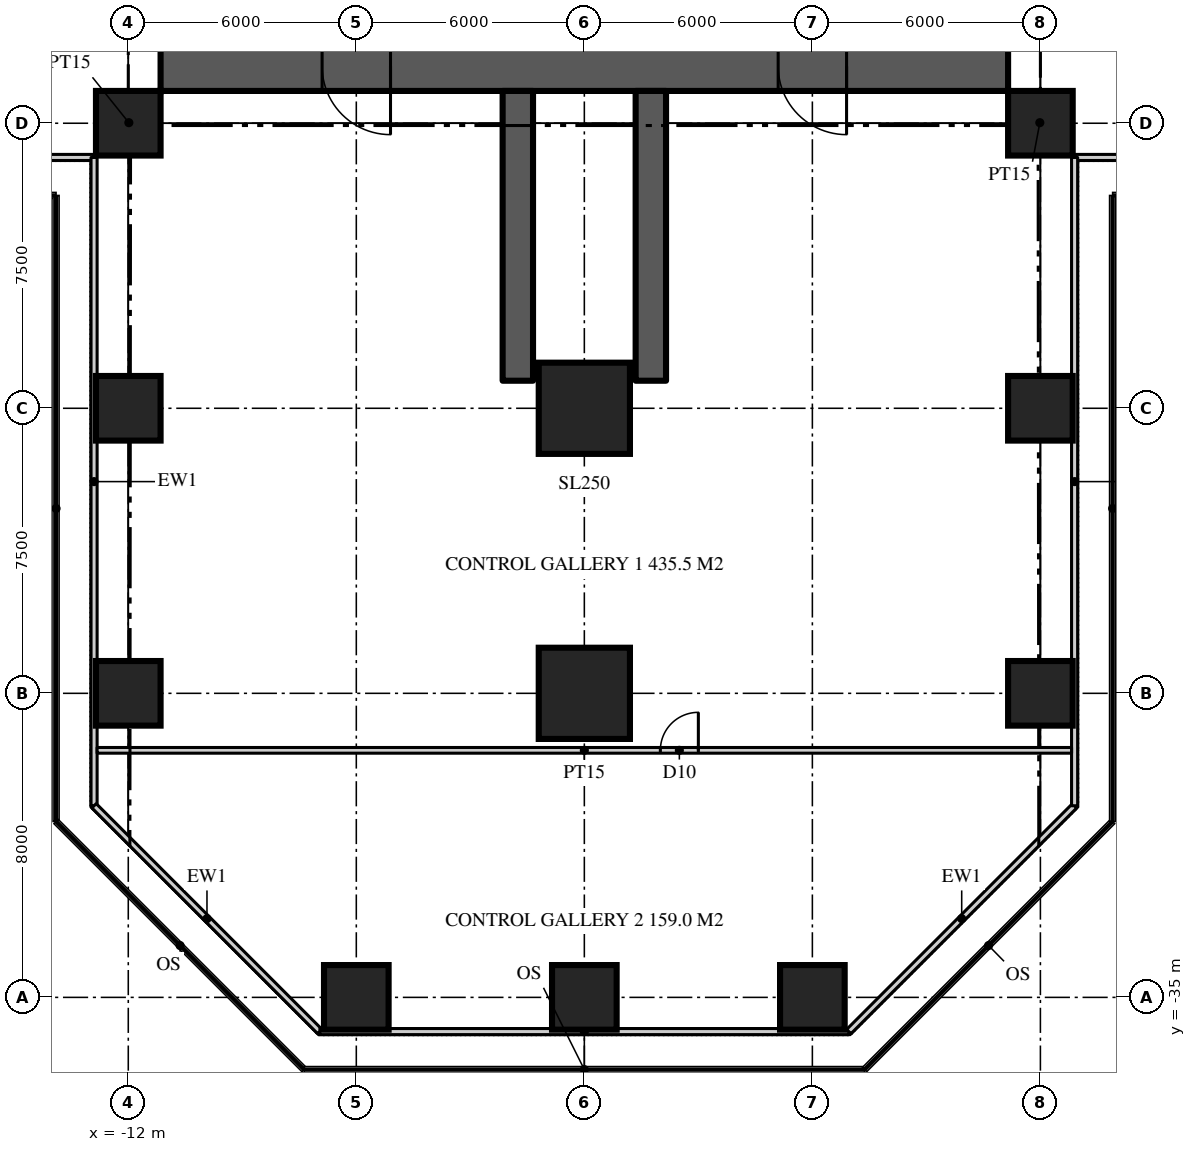
"""IFC4 building model, lengths in metres.
Left out: names, types, materials, properties, quantities, classifications, styles, units other than length and angle.
Written with IfcOpenShell. Run it as: python <this file> out.ifc"""

import sys

from ifc_helpers import new_model, si_unit, direction, frame, frame_2d, origin, origin_2d, place, context, subcontext, project, spatial, rectangle, extrude, element, fill, save


model = new_model("IFC4")
c1 = context("Model", 3, precision=1e-05, world=origin(), true_north=direction((0.0, 1.0)))
c2 = subcontext(c1, "Body", "Model", "MODEL_VIEW")
j1 = project(units=[si_unit("LENGTHUNIT", "METRE"), si_unit("PLANEANGLEUNIT", "RADIAN")], contexts=[c1])
p1 = place(None, origin())
s1 = spatial("IfcSite", under=j1, at=p1, CompositionType="ELEMENT")
p2 = place(p1, origin())
s2 = spatial("IfcBuilding", under=s1, at=p2, CompositionType="ELEMENT")
p3 = place(p2, frame((0.0, 0.0, 15.0)))
s3 = spatial("IfcBuildingStorey", under=s2, at=p3, CompositionType="ELEMENT", Elevation=15.0)
p4 = place(p3, frame((11.15, -10.5, 0.0), z_axis=(0.0, 0.0, 1.0), x_axis=(-1.0, 0.0, 0.0)))
e1 = element("IfcWall", 1, at=p4, inside=s3, PredefinedType="SHEAR", context=c2, shape_type="SweptSolid", body=[
    extrude(rectangle(XDim=22.3, YDim=1.3, at=frame_2d((11.15, 0.0))), origin(), (0.0, 0.0, 1.0), 8.0),
])
p5 = place(p4, frame((16.25, 0.0, 0.0)))
e2 = element("IfcOpeningElement", 2, at=p5, cuts=e1, PredefinedType="OPENING", context=c2, shape_type="SweptSolid", body=[
    extrude(rectangle(XDim=1.8, YDim=2.2, at=frame_2d((0.9, 1.1))), frame((0.0, 0.66, 0.0), z_axis=(0.0, -1.0, 0.0), x_axis=(1.0, 0.0, 0.0)), (0.0, 0.0, 1.0), 1.32),
])
p6 = place(p4, frame((4.25, 0.0, 0.0)))
e3 = element("IfcOpeningElement", 3, at=p6, cuts=e1, PredefinedType="OPENING", context=c2, shape_type="SweptSolid", body=[
    extrude(rectangle(XDim=1.8, YDim=2.2, at=frame_2d((0.9, 1.1))), frame((0.0, 0.66, 0.0), z_axis=(0.0, -1.0, 0.0), x_axis=(1.0, 0.0, 0.0)), (0.0, 0.0, 1.0), 1.32),
])
for number, where, z_axis, x_axis in (
    (4, (-1.75, -11.15, 0.0), (0.0, 0.0, 1.0), (0.0, -1.0, 0.0)),
    (5, (1.75, -11.15, 0.0), (0.0, 0.0, 1.0), (0.0, -1.0, 0.0)),
):
    element("IfcWall", number, at=place(p3, frame(where, z_axis=z_axis, x_axis=x_axis)), inside=s3, PredefinedType="SHEAR", context=c2, shape_type="SweptSolid", body=[
        extrude(rectangle(XDim=7.625, YDim=0.8, at=frame_2d((3.812, 0.0))), origin(), (0.0, 0.0, 1.0), 8.0),
    ])
for number, where, z_axis, x_axis in (
    (6, (-6.0, -35.0, 0.0), (0.0, 0.0, 1.0), (1.0, 0.0, 0.0)),
    (7, (0.0, -35.0, 0.0), (0.0, 0.0, 1.0), (1.0, 0.0, 0.0)),
    (8, (6.0, -35.0, 0.0), (0.0, 0.0, 1.0), (1.0, 0.0, 0.0)),
    (9, (-12.0, -27.0, 0.0), (0.0, 0.0, 1.0), (1.0, 0.0, 0.0)),
):
    element("IfcColumn", number, at=place(p3, frame(where, z_axis=z_axis, x_axis=x_axis)), inside=s3, PredefinedType="COLUMN", context=c2, shape_type="SweptSolid", body=[
        extrude(rectangle(XDim=1.7, YDim=1.7, at=origin_2d()), origin(), (0.0, 0.0, 1.0), 8.0),
    ])
p7 = place(p3, frame((0.0, -27.0, 0.0), z_axis=(0.0, 0.0, 1.0), x_axis=(1.0, 0.0, 0.0)))
e10 = element("IfcColumn", 10, at=p7, inside=s3, PredefinedType="COLUMN", context=c2, shape_type="SweptSolid", body=[
    extrude(rectangle(XDim=2.4, YDim=2.4, at=origin_2d()), origin(), (0.0, 0.0, 1.0), 8.0),
])
for number, where, z_axis, x_axis in (
    (11, (12.0, -27.0, 0.0), (0.0, 0.0, 1.0), (1.0, 0.0, 0.0)),
    (12, (-12.0, -19.5, 0.0), (0.0, 0.0, 1.0), (1.0, 0.0, 0.0)),
):
    element("IfcColumn", number, at=place(p3, frame(where, z_axis=z_axis, x_axis=x_axis)), inside=s3, PredefinedType="COLUMN", context=c2, shape_type="SweptSolid", body=[
        extrude(rectangle(XDim=1.7, YDim=1.7, at=origin_2d()), origin(), (0.0, 0.0, 1.0), 8.0),
    ])
p8 = place(p3, frame((0.0, -19.5, 0.0), z_axis=(0.0, 0.0, 1.0), x_axis=(1.0, 0.0, 0.0)))
e13 = element("IfcColumn", 13, at=p8, inside=s3, PredefinedType="COLUMN", context=c2, shape_type="SweptSolid", body=[
    extrude(rectangle(XDim=2.4, YDim=2.4, at=origin_2d()), origin(), (0.0, 0.0, 1.0), 8.0),
])
for number, where, z_axis, x_axis in (
    (14, (12.0, -19.5, 0.0), (0.0, 0.0, 1.0), (1.0, 0.0, 0.0)),
    (15, (-12.0, -12.0, 0.0), (0.0, 0.0, 1.0), (1.0, 0.0, 0.0)),
    (16, (12.0, -12.0, 0.0), (0.0, 0.0, 1.0), (1.0, 0.0, 0.0)),
):
    element("IfcColumn", number, at=place(p3, frame(where, z_axis=z_axis, x_axis=x_axis)), inside=s3, PredefinedType="COLUMN", context=c2, shape_type="SweptSolid", body=[
        extrude(rectangle(XDim=1.7, YDim=1.7, at=origin_2d()), origin(), (0.0, 0.0, 1.0), 8.0),
    ])
for number, where, z_axis, x_axis in (
    (17, (12.9, -12.9, 0.0), (0.0, 0.0, 1.0), (1.0, 0.0, 0.0)),
    (18, (-29.958, -12.9, 0.0), (0.0, 0.0, 1.0), (1.0, 0.0, 0.0)),
    (19, (-12.9, -12.9, 0.0), (0.0, 0.0, 1.0), (0.0, -1.0, 0.0)),
):
    element("IfcWall", number, at=place(p3, frame(where, z_axis=z_axis, x_axis=x_axis)), inside=s3, PredefinedType="SOLIDWALL", context=c2, shape_type="SweptSolid", body=[
        extrude(rectangle(XDim=17.059, YDim=0.16, at=frame_2d((8.529, 0.0))), origin(), (0.0, 0.0, 1.0), 7.75),
    ])
p9 = place(p3, frame((-12.9, -29.958, 0.0), z_axis=(0.0, 0.0, 1.0), x_axis=(0.707106781187, -0.707106781187, 0.0)))
e20 = element("IfcWall", 20, at=p9, inside=s3, PredefinedType="SOLIDWALL", context=c2, shape_type="SweptSolid", body=[
    extrude(rectangle(XDim=8.402, YDim=0.16, at=frame_2d((4.201, 0.0))), origin(), (0.0, 0.0, 1.0), 7.75),
])
p10 = place(p3, frame((-6.958, -35.9, 0.0), z_axis=(0.0, 0.0, 1.0), x_axis=(1.0, 0.0, 0.0)))
e21 = element("IfcWall", 21, at=p10, inside=s3, PredefinedType="SOLIDWALL", context=c2, shape_type="SweptSolid", body=[
    extrude(rectangle(XDim=13.917, YDim=0.16, at=frame_2d((6.958, 0.0))), origin(), (0.0, 0.0, 1.0), 7.75),
])
p11 = place(p3, frame((6.958, -35.9, 0.0), z_axis=(0.0, 0.0, 1.0), x_axis=(0.707106781187, 0.707106781187, 0.0)))
e22 = element("IfcWall", 22, at=p11, inside=s3, PredefinedType="SOLIDWALL", context=c2, shape_type="SweptSolid", body=[
    extrude(rectangle(XDim=8.402, YDim=0.16, at=frame_2d((4.201, 0.0))), origin(), (0.0, 0.0, 1.0), 7.75),
])
p12 = place(p3, frame((12.9, -29.958, 0.0), z_axis=(0.0, 0.0, 1.0), x_axis=(0.0, 1.0, 0.0)))
e23 = element("IfcWall", 23, at=p12, inside=s3, PredefinedType="SOLIDWALL", context=c2, shape_type="SweptSolid", body=[
    extrude(rectangle(XDim=17.059, YDim=0.16, at=frame_2d((8.529, 0.0))), origin(), (0.0, 0.0, 1.0), 7.75),
])
p13 = place(p3, frame((-12.82, -28.5, 0.0), z_axis=(0.0, 0.0, 1.0), x_axis=(1.0, 0.0, 0.0)))
e24 = element("IfcWall", 24, at=p13, inside=s3, PredefinedType="PARTITIONING", context=c2, shape_type="SweptSolid", body=[
    extrude(rectangle(XDim=25.64, YDim=0.15, at=frame_2d((12.82, 0.0))), origin(), (0.0, 0.0, 1.0), 7.75),
])
p14 = place(p13, frame((14.82, 0.0, 0.0)))
e25 = element("IfcOpeningElement", 25, at=p14, cuts=e24, PredefinedType="OPENING", context=c2, shape_type="SweptSolid", body=[
    extrude(rectangle(XDim=1.0, YDim=2.2, at=frame_2d((0.5, 1.1))), frame((0.0, 0.085, 0.0), z_axis=(0.0, -1.0, 0.0), x_axis=(1.0, 0.0, 0.0)), (0.0, 0.0, 1.0), 0.17),
])
for number, where, z_axis, x_axis in (
    (26, (-11.15, -11.15, 0.0), (0.0, 0.0, 1.0), (-0.707, -0.707, 0.0)),
    (27, (11.15, -11.15, 0.0), (0.0, 0.0, 1.0), (0.707, -0.707, 0.0)),
):
    element("IfcWall", number, at=place(p3, frame(where, z_axis=z_axis, x_axis=x_axis)), inside=s3, PredefinedType="PARTITIONING", context=c2, shape_type="SweptSolid", body=[
        extrude(rectangle(XDim=2.362, YDim=0.15, at=frame_2d((1.181, 0.0))), origin(), (0.0, 0.0, 1.0), 7.75),
    ])
p15 = place(p5, origin())
e28 = element("IfcDoor", 28, at=p15, inside=s3, OperationType="DOUBLE_DOOR_DOUBLE_SWING", PredefinedType="DOOR", context=c2, shape_type="SweptSolid", body=[
    extrude(rectangle(XDim=1.8, YDim=2.2, at=frame_2d((0.9, 1.1))), frame((0.0, 0.025, 0.0), z_axis=(0.0, -1.0, 0.0), x_axis=(1.0, 0.0, 0.0)), (0.0, 0.0, 1.0), 0.05),
])
fill(e2, e28)
p16 = place(p6, origin())
e29 = element("IfcDoor", 29, at=p16, inside=s3, OperationType="DOUBLE_DOOR_DOUBLE_SWING", PredefinedType="DOOR", context=c2, shape_type="SweptSolid", body=[
    extrude(rectangle(XDim=1.8, YDim=2.2, at=frame_2d((0.9, 1.1))), frame((0.0, 0.025, 0.0), z_axis=(0.0, -1.0, 0.0), x_axis=(1.0, 0.0, 0.0)), (0.0, 0.0, 1.0), 0.05),
])
fill(e3, e29)
p17 = place(p14, origin())
e30 = element("IfcDoor", 30, at=p17, inside=s3, OperationType="SINGLE_SWING_RIGHT", PredefinedType="DOOR", context=c2, shape_type="SweptSolid", body=[
    extrude(rectangle(XDim=1.0, YDim=2.2, at=frame_2d((0.5, 1.1))), frame((0.0, 0.025, 0.0), z_axis=(0.0, -1.0, 0.0), x_axis=(1.0, 0.0, 0.0)), (0.0, 0.0, 1.0), 0.05),
])
fill(e25, e30)
save(model, sys.argv[1])
